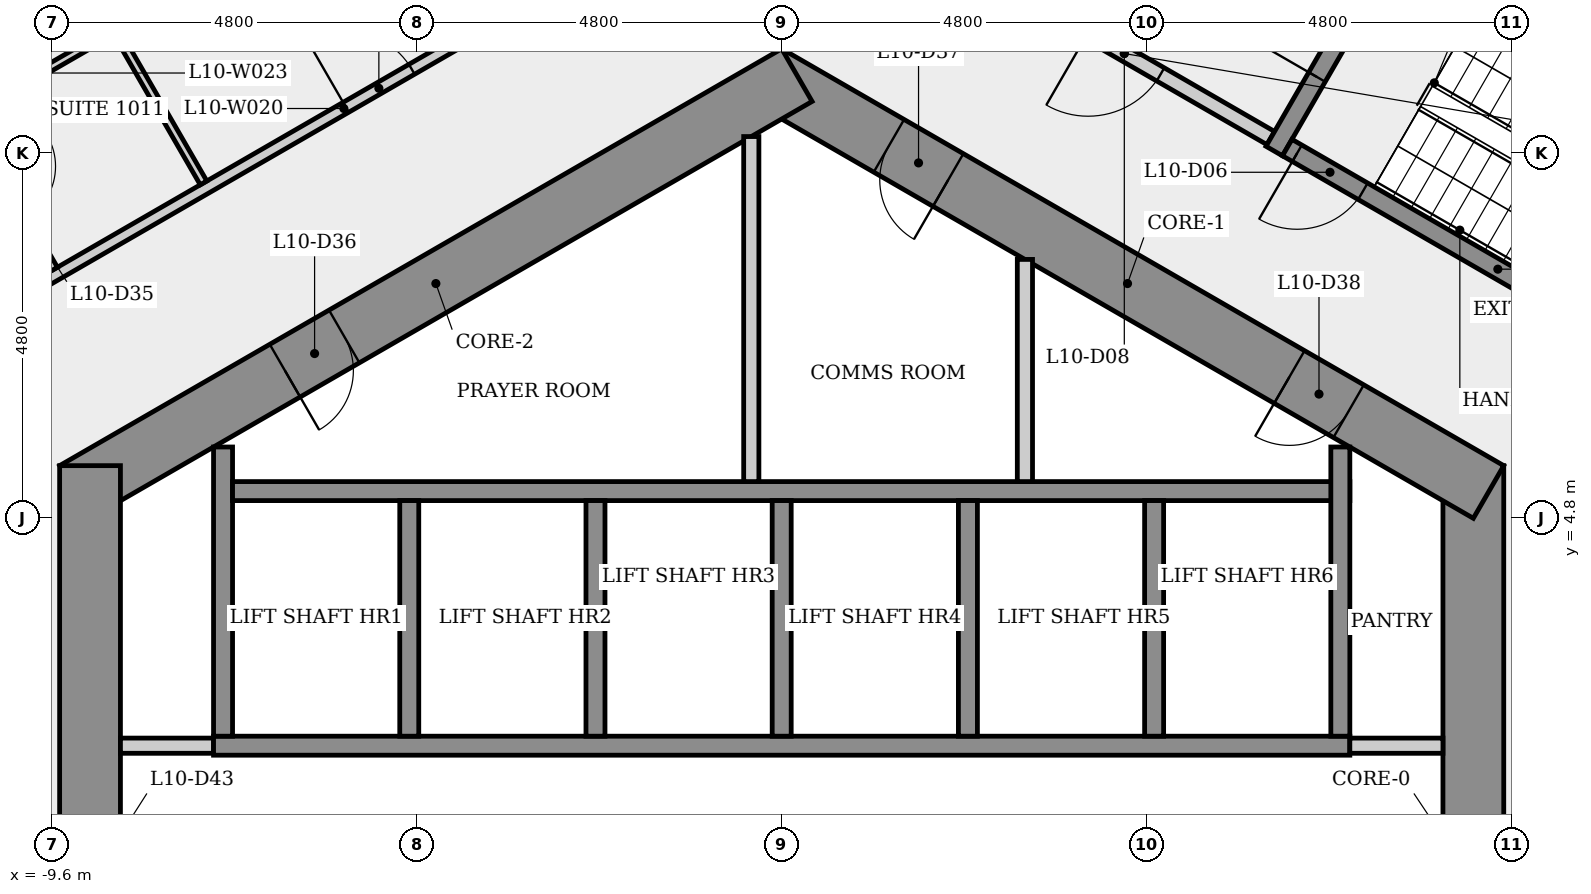
"""IFC4 building model, lengths in metres.
Left out: names, types, materials, properties, quantities, classifications, styles, units other than length and angle.
Written with IfcOpenShell. Run it as: python <this file> out.ifc"""

import sys

from ifc_helpers import new_model, si_unit, direction, frame, frame_2d, origin, place, context, subcontext, project, spatial, rectangle, extrude, element, fill, save


model = new_model("IFC4")
c1 = context("Model", 3, precision=1e-05, world=origin(), true_north=direction((0.0, 1.0)))
c2 = subcontext(c1, "Body", "Model", "MODEL_VIEW")
j1 = project(units=[si_unit("LENGTHUNIT", "METRE"), si_unit("PLANEANGLEUNIT", "RADIAN")], contexts=[c1])
p1 = place(None, origin())
s1 = spatial("IfcSite", under=j1, at=p1, CompositionType="ELEMENT")
p2 = place(p1, origin())
s2 = spatial("IfcBuilding", under=s1, at=p2, CompositionType="ELEMENT")
p3 = place(p2, frame((0.0, 0.0, 42.5)))
s3 = spatial("IfcBuildingStorey", under=s2, at=p3, CompositionType="ELEMENT", Elevation=42.5)
p4 = place(p3, frame((9.1, -5.485, 0.0), z_axis=(0.0, 0.0, 1.0), x_axis=(0.0, 1.0, 0.0)))
e1 = element("IfcWall", 1, at=p4, inside=s3, PredefinedType="SHEAR", context=c2, shape_type="SweptSolid", body=[
    extrude(rectangle(XDim=10.97, YDim=0.8, at=frame_2d((5.485, 0.0))), origin(), (0.0, 0.0, 1.0), 3.4),
])
p5 = place(p4, frame((4.685, 0.0, 0.0)))
e2 = element("IfcOpeningElement", 2, at=p5, cuts=e1, PredefinedType="OPENING", context=c2, shape_type="SweptSolid", body=[
    extrude(rectangle(XDim=1.6, YDim=2.1, at=frame_2d((0.8, 1.05))), frame((0.0, 0.41, 0.0), z_axis=(0.0, -1.0, 0.0), x_axis=(1.0, 0.0, 0.0)), (0.0, 0.0, 1.0), 0.82),
])
p6 = place(p3, frame((9.3, 5.138, 0.0), z_axis=(0.0, 0.0, 1.0), x_axis=(-0.866023993627, 0.500002442456, 0.0)))
e3 = element("IfcWall", 3, at=p6, inside=s3, PredefinedType="SHEAR", context=c2, shape_type="SweptSolid", body=[
    extrude(rectangle(XDim=10.97, YDim=0.8, at=frame_2d((5.485, 0.0))), origin(), (0.0, 0.0, 1.0), 3.4),
])
p7 = place(p6, frame((8.21, 0.0, 0.0)))
e4 = element("IfcOpeningElement", 4, at=p7, cuts=e3, PredefinedType="OPENING", context=c2, shape_type="SweptSolid", body=[
    extrude(rectangle(XDim=0.9, YDim=2.1, at=frame_2d((0.45, 1.05))), frame((0.0, 0.41, 0.0), z_axis=(0.0, -1.0, 0.0), x_axis=(1.0, 0.0, 0.0)), (0.0, 0.0, 1.0), 0.82),
])
p8 = place(p6, frame((2.126, 0.0, 0.0)))
e5 = element("IfcOpeningElement", 5, at=p8, cuts=e3, PredefinedType="OPENING", context=c2, shape_type="SweptSolid", body=[
    extrude(rectangle(XDim=0.9, YDim=2.1, at=frame_2d((0.45, 1.05))), frame((0.0, 0.41, 0.0), z_axis=(0.0, -1.0, 0.0), x_axis=(1.0, 0.0, 0.0)), (0.0, 0.0, 1.0), 0.82),
])
p9 = place(p3, frame((0.2, 10.623, 0.0), z_axis=(0.0, 0.0, 1.0), x_axis=(-0.866023993627, -0.500002442456, 0.0)))
e6 = element("IfcWall", 6, at=p9, inside=s3, PredefinedType="SHEAR", context=c2, shape_type="SweptSolid", body=[
    extrude(rectangle(XDim=10.97, YDim=0.8, at=frame_2d((5.485, 0.0))), origin(), (0.0, 0.0, 1.0), 3.4),
])
p10 = place(p9, frame((6.877, 0.0, 0.0)))
e7 = element("IfcOpeningElement", 7, at=p10, cuts=e6, PredefinedType="OPENING", context=c2, shape_type="SweptSolid", body=[
    extrude(rectangle(XDim=0.9, YDim=2.1, at=frame_2d((0.45, 1.05))), frame((0.0, 0.41, 0.0), z_axis=(0.0, -1.0, 0.0), x_axis=(1.0, 0.0, 0.0)), (0.0, 0.0, 1.0), 0.82),
])
p11 = place(p3, frame((-9.1, 5.485, 0.0), z_axis=(0.0, 0.0, 1.0), x_axis=(0.0, -1.0, 0.0)))
e8 = element("IfcWall", 8, at=p11, inside=s3, PredefinedType="SHEAR", context=c2, shape_type="SweptSolid", body=[
    extrude(rectangle(XDim=10.97, YDim=0.8, at=frame_2d((5.485, 0.0))), origin(), (0.0, 0.0, 1.0), 3.4),
])
p12 = place(p11, frame((4.685, 0.0, 0.0)))
e9 = element("IfcOpeningElement", 9, at=p12, cuts=e8, PredefinedType="OPENING", context=c2, shape_type="SweptSolid", body=[
    extrude(rectangle(XDim=1.6, YDim=2.1, at=frame_2d((0.8, 1.05))), frame((0.0, 0.41, 0.0), z_axis=(0.0, -1.0, 0.0), x_axis=(1.0, 0.0, 0.0)), (0.0, 0.0, 1.0), 0.82),
])
p13 = place(p3, frame((-10.829, 7.258, 0.0), z_axis=(0.0, 0.0, 1.0), x_axis=(0.86602927387, 0.499993296755, 0.0)))
e10 = element("IfcWall", 10, at=p13, inside=s3, PredefinedType="PARTITIONING", context=c2, shape_type="SweptSolid", body=[
    extrude(rectangle(XDim=11.704, YDim=0.15, at=frame_2d((5.852, 0.0))), origin(), (0.0, 0.0, 1.0), 3.05),
])
p14 = place(p13, frame((5.884, 0.0, 0.0)))
e11 = element("IfcOpeningElement", 11, at=p14, cuts=e10, PredefinedType="OPENING", context=c2, shape_type="SweptSolid", body=[
    extrude(rectangle(XDim=1.0, YDim=2.1, at=frame_2d((0.5, 1.05))), frame((0.0, 0.085, 0.0), z_axis=(0.0, -1.0, 0.0), x_axis=(1.0, 0.0, 0.0)), (0.0, 0.0, 1.0), 0.17),
])
p15 = place(p3, frame((-10.76, 10.127, 0.0), z_axis=(0.0, 0.0, 1.0), x_axis=(0.499986429846, -0.866033238375, 0.0)))
e12 = element("IfcWall", 12, at=p15, inside=s3, PredefinedType="PARTITIONING", context=c2, shape_type="SweptSolid", body=[
    extrude(rectangle(XDim=2.375, YDim=0.1, at=frame_2d((1.188, 0.0))), origin(), (0.0, 0.0, 1.0), 3.05),
])
p16 = place(p15, frame((0.812, 0.0, 0.0)))
e13 = element("IfcOpeningElement", 13, at=p16, cuts=e12, PredefinedType="OPENING", context=c2, shape_type="SweptSolid", body=[
    extrude(rectangle(XDim=0.8, YDim=2.1, at=frame_2d((0.4, 1.05))), frame((0.0, 0.06, 0.0), z_axis=(0.0, -1.0, 0.0), x_axis=(1.0, 0.0, 0.0)), (0.0, 0.0, 1.0), 0.12),
])
p17 = place(p3, frame((-8.812, 11.193, 0.0), z_axis=(0.0, 0.0, 1.0), x_axis=(-0.866046953215, -0.499962673433, 0.0)))
e14 = element("IfcWall", 14, at=p17, inside=s3, PredefinedType="PARTITIONING", context=c2, shape_type="SweptSolid", body=[
    extrude(rectangle(XDim=2.17, YDim=0.1, at=frame_2d((1.085, 0.0))), origin(), (0.0, 0.0, 1.0), 3.05),
])
p18 = place(p3, frame((-12.111, 17.008, 0.0), z_axis=(0.0, 0.0, 1.0), x_axis=(0.499977347544, -0.866038481791, 0.0)))
e15 = element("IfcWall", 15, at=p18, inside=s3, PredefinedType="PARTITIONING", context=c2, shape_type="SweptSolid", body=[
    extrude(rectangle(XDim=9.01, YDim=0.1, at=frame_2d((4.505, 0.0))), origin(), (0.0, 0.0, 1.0), 3.05),
])
p19 = place(p3, frame((-8.7, 1.8, 0.0), z_axis=(0.0, 0.0, 1.0), x_axis=(1.0, 0.0, 0.0)))
e16 = element("IfcWall", 16, at=p19, inside=s3, PredefinedType="PARTITIONING", context=c2, shape_type="SweptSolid", body=[
    extrude(rectangle(XDim=1.225, YDim=0.2, at=frame_2d((0.613, 0.0))), origin(), (0.0, 0.0, 1.0), 3.05),
])
p20 = place(p3, frame((-7.475, 1.8, 0.0), z_axis=(0.0, 0.0, 1.0), x_axis=(1.0, 0.0, 0.0)))
e17 = element("IfcWall", 17, at=p20, inside=s3, PredefinedType="SHEAR", context=c2, shape_type="SweptSolid", body=[
    extrude(rectangle(XDim=14.95, YDim=0.25, at=frame_2d((7.475, 0.0))), origin(), (0.0, 0.0, 1.0), 3.05),
])
p21 = place(p3, frame((-7.35, 1.925, 0.0), z_axis=(0.0, 0.0, 1.0), x_axis=(0.0, 1.0, 0.0)))
e18 = element("IfcWall", 18, at=p21, inside=s3, PredefinedType="SHEAR", context=c2, shape_type="SweptSolid", body=[
    extrude(rectangle(XDim=3.805, YDim=0.25, at=frame_2d((1.903, 0.0))), origin(), (0.0, 0.0, 1.0), 3.05),
])
p22 = place(p3, frame((-7.225, 5.15, 0.0), z_axis=(0.0, 0.0, 1.0), x_axis=(1.0, 0.0, 0.0)))
e19 = element("IfcWall", 19, at=p22, inside=s3, PredefinedType="SHEAR", context=c2, shape_type="SweptSolid", body=[
    extrude(rectangle(XDim=14.7, YDim=0.25, at=frame_2d((7.35, 0.0))), origin(), (0.0, 0.0, 1.0), 3.05),
])
for number, where, z_axis, x_axis in (
    (20, (-4.9, 5.025, 0.0), (0.0, 0.0, 1.0), (0.0, -1.0, 0.0)),
    (21, (-2.45, 5.025, 0.0), (0.0, 0.0, 1.0), (0.0, -1.0, 0.0)),
):
    element("IfcWall", number, at=place(p3, frame(where, z_axis=z_axis, x_axis=x_axis)), inside=s3, PredefinedType="SHEAR", context=c2, shape_type="SweptSolid", body=[
        extrude(rectangle(XDim=3.1, YDim=0.25, at=frame_2d((1.55, 0.0))), origin(), (0.0, 0.0, 1.0), 3.4),
    ])
p23 = place(p3, frame((-0.4, 9.815, 0.0), z_axis=(0.0, 0.0, 1.0), x_axis=(0.0, -1.0, 0.0)))
e22 = element("IfcWall", 22, at=p23, inside=s3, PredefinedType="PARTITIONING", context=c2, shape_type="SweptSolid", body=[
    extrude(rectangle(XDim=4.54, YDim=0.2, at=frame_2d((2.27, 0.0))), origin(), (0.0, 0.0, 1.0), 3.05),
])
for number, where, z_axis, x_axis in (
    (23, (0.0, 5.025, 0.0), (0.0, 0.0, 1.0), (0.0, -1.0, 0.0)),
    (24, (2.45, 5.025, 0.0), (0.0, 0.0, 1.0), (0.0, -1.0, 0.0)),
):
    element("IfcWall", number, at=place(p3, frame(where, z_axis=z_axis, x_axis=x_axis)), inside=s3, PredefinedType="SHEAR", context=c2, shape_type="SweptSolid", body=[
        extrude(rectangle(XDim=3.1, YDim=0.25, at=frame_2d((1.55, 0.0))), origin(), (0.0, 0.0, 1.0), 3.4),
    ])
p24 = place(p3, frame((3.2, 8.198, 0.0), z_axis=(0.0, 0.0, 1.0), x_axis=(0.0, -1.0, 0.0)))
e25 = element("IfcWall", 25, at=p24, inside=s3, PredefinedType="PARTITIONING", context=c2, shape_type="SweptSolid", body=[
    extrude(rectangle(XDim=2.924, YDim=0.2, at=frame_2d((1.462, 0.0))), origin(), (0.0, 0.0, 1.0), 3.05),
])
p25 = place(p3, frame((4.9, 5.025, 0.0), z_axis=(0.0, 0.0, 1.0), x_axis=(0.0, -1.0, 0.0)))
e26 = element("IfcWall", 26, at=p25, inside=s3, PredefinedType="SHEAR", context=c2, shape_type="SweptSolid", body=[
    extrude(rectangle(XDim=3.1, YDim=0.25, at=frame_2d((1.55, 0.0))), origin(), (0.0, 0.0, 1.0), 3.4),
])
p26 = place(p3, frame((6.435, 9.795, 0.0), z_axis=(0.0, 0.0, 1.0), x_axis=(-0.866012907634, 0.500021643343, 0.0)))
e27 = element("IfcWall", 27, at=p26, inside=s3, PredefinedType="PARTITIONING", context=c2, shape_type="SweptSolid", body=[
    extrude(rectangle(XDim=4.45, YDim=0.2, at=frame_2d((2.225, 0.0))), origin(), (0.0, 0.0, 1.0), 3.05),
])
p27 = place(p26, frame((1.675, 0.0, 0.0)))
e28 = element("IfcOpeningElement", 28, at=p27, cuts=e27, PredefinedType="OPENING", context=c2, shape_type="SweptSolid", body=[
    extrude(rectangle(XDim=1.1, YDim=2.1, at=frame_2d((0.55, 1.05))), frame((0.0, 0.11, 0.0), z_axis=(0.0, -1.0, 0.0), x_axis=(1.0, 0.0, 0.0)), (0.0, 0.0, 1.0), 0.22),
])
p28 = place(p3, frame((6.48, 9.624, 0.0), z_axis=(0.0, 0.0, 1.0), x_axis=(0.500017246033, 0.866015446554, 0.0)))
e29 = element("IfcWall", 29, at=p28, inside=s3, PredefinedType="SHEAR", context=c2, shape_type="SweptSolid", body=[
    extrude(rectangle(XDim=3.25, YDim=0.25, at=frame_2d((1.625, 0.0))), origin(), (0.0, 0.0, 1.0), 3.05),
])
p29 = place(p28, frame((1.125, 0.0, 0.0)))
e30 = element("IfcOpeningElement", 30, at=p29, cuts=e29, PredefinedType="OPENING", context=c2, shape_type="SweptSolid", body=[
    extrude(rectangle(XDim=1.0, YDim=2.1, at=frame_2d((0.5, 1.05))), frame((0.0, 0.135, 0.0), z_axis=(0.0, -1.0, 0.0), x_axis=(1.0, 0.0, 0.0)), (0.0, 0.0, 1.0), 0.27),
])
p30 = place(p3, frame((7.475, 1.8, 0.0), z_axis=(0.0, 0.0, 1.0), x_axis=(1.0, 0.0, 0.0)))
e31 = element("IfcWall", 31, at=p30, inside=s3, PredefinedType="PARTITIONING", context=c2, shape_type="SweptSolid", body=[
    extrude(rectangle(XDim=1.225, YDim=0.2, at=frame_2d((0.613, 0.0))), origin(), (0.0, 0.0, 1.0), 3.05),
])
p31 = place(p3, frame((7.35, 5.73, 0.0), z_axis=(0.0, 0.0, 1.0), x_axis=(0.0, -1.0, 0.0)))
e32 = element("IfcWall", 32, at=p31, inside=s3, PredefinedType="SHEAR", context=c2, shape_type="SweptSolid", body=[
    extrude(rectangle(XDim=3.805, YDim=0.25, at=frame_2d((1.903, 0.0))), origin(), (0.0, 0.0, 1.0), 3.05),
])
p32 = place(p3, frame((8.151, 12.268, 0.0), z_axis=(0.0, 0.0, 1.0), x_axis=(0.866025499775, -0.499999833739, 0.0)))
e33 = element("IfcWall", 33, at=p32, inside=s3, PredefinedType="SHEAR", context=c2, shape_type="SweptSolid", body=[
    extrude(rectangle(XDim=6.4, YDim=0.25, at=frame_2d((3.2, 0.0))), origin(), (0.0, 0.0, 1.0), 3.05),
])
p33 = place(p3, frame((12.194, 6.47, 0.0), z_axis=(0.0, 0.0, 1.0), x_axis=(-0.866025499775, 0.499999833739, 0.0)))
e34 = element("IfcWall", 34, at=p33, inside=s3, PredefinedType="SHEAR", context=c2, shape_type="SweptSolid", body=[
    extrude(rectangle(XDim=6.4, YDim=0.25, at=frame_2d((3.2, 0.0))), origin(), (0.0, 0.0, 1.0), 3.05),
])
p34 = place(p33, frame((5.25, 0.0, 0.0)))
e35 = element("IfcOpeningElement", 35, at=p34, cuts=e34, PredefinedType="OPENING", context=c2, shape_type="SweptSolid", body=[
    extrude(rectangle(XDim=1.0, YDim=2.1, at=frame_2d((0.5, 1.05))), frame((0.0, 0.135, 0.0), z_axis=(0.0, -1.0, 0.0), x_axis=(1.0, 0.0, 0.0)), (0.0, 0.0, 1.0), 0.27),
])
p35 = place(p34, origin())
e36 = element("IfcDoor", 36, at=p35, inside=s3, OperationType="SINGLE_SWING_RIGHT", PredefinedType="DOOR", context=c2, shape_type="SweptSolid", body=[
    extrude(rectangle(XDim=1.0, YDim=2.1, at=frame_2d((0.5, 1.05))), frame((0.0, 0.025, 0.0), z_axis=(0.0, -1.0, 0.0), x_axis=(1.0, 0.0, 0.0)), (0.0, 0.0, 1.0), 0.05),
])
fill(e35, e36)
p36 = place(p29, origin())
e37 = element("IfcDoor", 37, at=p36, inside=s3, OperationType="SINGLE_SWING_LEFT", PredefinedType="DOOR", context=c2, shape_type="SweptSolid", body=[
    extrude(rectangle(XDim=1.0, YDim=2.1, at=frame_2d((0.5, 1.05))), frame((0.0, 0.025, 0.0), z_axis=(0.0, -1.0, 0.0), x_axis=(1.0, 0.0, 0.0)), (0.0, 0.0, 1.0), 0.05),
])
fill(e30, e37)
p37 = place(p27, origin())
e38 = element("IfcDoor", 38, at=p37, inside=s3, OperationType="SINGLE_SWING_RIGHT", PredefinedType="DOOR", context=c2, shape_type="SweptSolid", body=[
    extrude(rectangle(XDim=1.1, YDim=2.1, at=frame_2d((0.55, 1.05))), frame((0.0, 0.025, 0.0), z_axis=(0.0, -1.0, 0.0), x_axis=(1.0, 0.0, 0.0)), (0.0, 0.0, 1.0), 0.05),
])
fill(e28, e38)
p38 = place(p14, origin())
e39 = element("IfcDoor", 39, at=p38, inside=s3, OperationType="SINGLE_SWING_LEFT", PredefinedType="DOOR", context=c2, shape_type="SweptSolid", body=[
    extrude(rectangle(XDim=1.0, YDim=2.1, at=frame_2d((0.5, 1.05))), frame((0.0, 0.025, 0.0), z_axis=(0.0, -1.0, 0.0), x_axis=(1.0, 0.0, 0.0)), (0.0, 0.0, 1.0), 0.05),
])
fill(e11, e39)
p39 = place(p10, origin())
e40 = element("IfcDoor", 40, at=p39, inside=s3, OperationType="SINGLE_SWING_RIGHT", PredefinedType="DOOR", context=c2, shape_type="SweptSolid", body=[
    extrude(rectangle(XDim=0.9, YDim=2.1, at=frame_2d((0.45, 1.05))), frame((0.0, 0.025, 0.0), z_axis=(0.0, -1.0, 0.0), x_axis=(1.0, 0.0, 0.0)), (0.0, 0.0, 1.0), 0.05),
])
fill(e7, e40)
p40 = place(p7, origin())
e41 = element("IfcDoor", 41, at=p40, inside=s3, OperationType="SINGLE_SWING_LEFT", PredefinedType="DOOR", context=c2, shape_type="SweptSolid", body=[
    extrude(rectangle(XDim=0.9, YDim=2.1, at=frame_2d((0.45, 1.05))), frame((0.0, 0.025, 0.0), z_axis=(0.0, -1.0, 0.0), x_axis=(1.0, 0.0, 0.0)), (0.0, 0.0, 1.0), 0.05),
])
fill(e4, e41)
p41 = place(p8, origin())
e42 = element("IfcDoor", 42, at=p41, inside=s3, OperationType="SINGLE_SWING_RIGHT", PredefinedType="DOOR", context=c2, shape_type="SweptSolid", body=[
    extrude(rectangle(XDim=0.9, YDim=2.1, at=frame_2d((0.45, 1.05))), frame((0.0, 0.025, 0.0), z_axis=(0.0, -1.0, 0.0), x_axis=(1.0, 0.0, 0.0)), (0.0, 0.0, 1.0), 0.05),
])
fill(e5, e42)
save(model, sys.argv[1])
